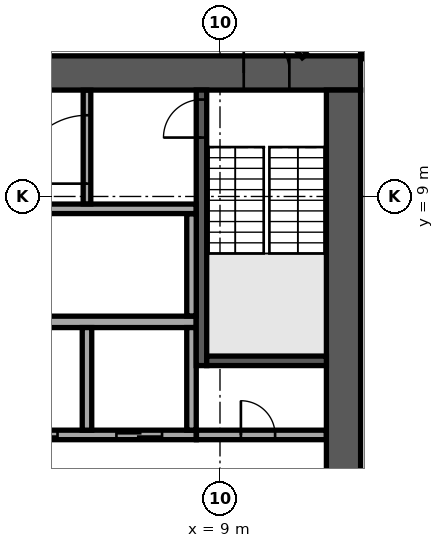
"""IFC4 building model, lengths in metres.
Left out: names, types, materials, properties, quantities, classifications, styles, units other than length and angle.
Written with IfcOpenShell. Run it as: python <this file> out.ifc"""

import sys

from ifc_helpers import new_model, si_unit, direction, frame, frame_2d, origin, place, context, subcontext, project, spatial, rectangle, extrude, element, fill, save


model = new_model("IFC4")
c1 = context("Model", 3, precision=1e-05, world=origin(), true_north=direction((0.0, 1.0)))
c2 = subcontext(c1, "Body", "Model", "MODEL_VIEW")
j1 = project(units=[si_unit("LENGTHUNIT", "METRE"), si_unit("PLANEANGLEUNIT", "RADIAN")], contexts=[c1])
p1 = place(None, origin())
s1 = spatial("IfcSite", under=j1, at=p1, CompositionType="ELEMENT")
p2 = place(p1, origin())
s2 = spatial("IfcBuilding", under=s1, at=p2, CompositionType="ELEMENT")
p3 = place(p2, frame((0.0, 0.0, 225.3)))
s3 = spatial("IfcBuildingStorey", under=s2, at=p3, CompositionType="ELEMENT", Elevation=225.3)
p4 = place(p3, frame((-12.7, 12.25, 0.0), z_axis=(0.0, 0.0, 1.0), x_axis=(1.0, 0.0, 0.0)))
e1 = element("IfcWall", 1, at=p4, inside=s3, PredefinedType="SHEAR", context=c2, shape_type="SweptSolid", body=[
    extrude(rectangle(XDim=25.4, YDim=0.9, at=frame_2d((12.7, 0.0))), origin(), (0.0, 0.0, 1.0), 3.62),
])
p5 = place(p4, frame((11.5, 0.0, 0.0)))
e2 = element("IfcOpeningElement", 2, at=p5, cuts=e1, PredefinedType="OPENING", context=c2, shape_type="SweptSolid", body=[
    extrude(rectangle(XDim=2.4, YDim=2.4, at=frame_2d((1.2, 1.2))), frame((0.0, 0.46, 0.0), z_axis=(0.0, -1.0, 0.0), x_axis=(1.0, 0.0, 0.0)), (0.0, 0.0, 1.0), 0.92),
])
p6 = place(p4, frame((22.325, 0.0, 0.0)))
e3 = element("IfcOpeningElement", 3, at=p6, cuts=e1, PredefinedType="OPENING", context=c2, shape_type="SweptSolid", body=[
    extrude(rectangle(XDim=1.2, YDim=2.1, at=frame_2d((0.6, 1.05))), frame((0.0, 0.46, 0.0), z_axis=(0.0, -1.0, 0.0), x_axis=(1.0, 0.0, 0.0)), (0.0, 0.0, 1.0), 0.92),
])
p7 = place(p4, frame((1.3, 0.0, 0.0)))
e4 = element("IfcOpeningElement", 4, at=p7, cuts=e1, PredefinedType="OPENING", context=c2, shape_type="SweptSolid", body=[
    extrude(rectangle(XDim=1.0, YDim=2.1, at=frame_2d((0.5, 1.05))), frame((0.0, 0.46, 0.0), z_axis=(0.0, -1.0, 0.0), x_axis=(1.0, 0.0, 0.0)), (0.0, 0.0, 1.0), 0.92),
])
p8 = place(p3, frame((12.25, -11.8, 0.0), z_axis=(0.0, 0.0, 1.0), x_axis=(0.0, 1.0, 0.0)))
e5 = element("IfcWall", 5, at=p8, inside=s3, PredefinedType="SHEAR", context=c2, shape_type="SweptSolid", body=[
    extrude(rectangle(XDim=23.6, YDim=0.9, at=frame_2d((11.8, 0.0))), origin(), (0.0, 0.0, 1.0), 3.62),
])
p9 = place(p8, frame((10.6, 0.0, 0.0)))
e6 = element("IfcOpeningElement", 6, at=p9, cuts=e5, PredefinedType="OPENING", context=c2, shape_type="SweptSolid", body=[
    extrude(rectangle(XDim=2.4, YDim=2.4, at=frame_2d((1.2, 1.2))), frame((0.0, 0.46, 0.0), z_axis=(0.0, -1.0, 0.0), x_axis=(1.0, 0.0, 0.0)), (0.0, 0.0, 1.0), 0.92),
])
p10 = place(p3, frame((-8.375, 5.7, 0.0), z_axis=(0.0, 0.0, 1.0), x_axis=(1.0, 0.0, 0.0)))
e7 = element("IfcWall", 7, at=p10, inside=s3, PredefinedType="SOLIDWALL", context=c2, shape_type="SweptSolid", body=[
    extrude(rectangle(XDim=16.75, YDim=0.3, at=frame_2d((8.375, 0.0))), origin(), (0.0, 0.0, 1.0), 3.62),
])
p11 = place(p3, frame((-8.375, 2.725, 0.0), z_axis=(0.0, 0.0, 1.0), x_axis=(1.0, 0.0, 0.0)))
e8 = element("IfcWall", 8, at=p11, inside=s3, PredefinedType="SOLIDWALL", context=c2, shape_type="SweptSolid", body=[
    extrude(rectangle(XDim=16.75, YDim=0.25, at=frame_2d((8.375, 0.0))), origin(), (0.0, 0.0, 1.0), 3.62),
])
p12 = place(p11, frame((0.9, 0.0, 0.0)))
e9 = element("IfcOpeningElement", 9, at=p12, cuts=e8, PredefinedType="OPENING", context=c2, shape_type="SweptSolid", body=[
    extrude(rectangle(XDim=1.2, YDim=2.1, at=frame_2d((0.6, 1.05))), frame((0.0, 0.135, 0.0), z_axis=(0.0, -1.0, 0.0), x_axis=(1.0, 0.0, 0.0)), (0.0, 0.0, 1.0), 0.27),
])
p13 = place(p11, frame((3.65, 0.0, 0.0)))
e10 = element("IfcOpeningElement", 10, at=p13, cuts=e8, PredefinedType="OPENING", context=c2, shape_type="SweptSolid", body=[
    extrude(rectangle(XDim=1.2, YDim=2.1, at=frame_2d((0.6, 1.05))), frame((0.0, 0.135, 0.0), z_axis=(0.0, -1.0, 0.0), x_axis=(1.0, 0.0, 0.0)), (0.0, 0.0, 1.0), 0.27),
])
p14 = place(p11, frame((6.4, 0.0, 0.0)))
e11 = element("IfcOpeningElement", 11, at=p14, cuts=e8, PredefinedType="OPENING", context=c2, shape_type="SweptSolid", body=[
    extrude(rectangle(XDim=1.2, YDim=2.1, at=frame_2d((0.6, 1.05))), frame((0.0, 0.135, 0.0), z_axis=(0.0, -1.0, 0.0), x_axis=(1.0, 0.0, 0.0)), (0.0, 0.0, 1.0), 0.27),
])
p15 = place(p11, frame((9.15, 0.0, 0.0)))
e12 = element("IfcOpeningElement", 12, at=p15, cuts=e8, PredefinedType="OPENING", context=c2, shape_type="SweptSolid", body=[
    extrude(rectangle(XDim=1.2, YDim=2.1, at=frame_2d((0.6, 1.05))), frame((0.0, 0.135, 0.0), z_axis=(0.0, -1.0, 0.0), x_axis=(1.0, 0.0, 0.0)), (0.0, 0.0, 1.0), 0.27),
])
p16 = place(p11, frame((11.9, 0.0, 0.0)))
e13 = element("IfcOpeningElement", 13, at=p16, cuts=e8, PredefinedType="OPENING", context=c2, shape_type="SweptSolid", body=[
    extrude(rectangle(XDim=1.2, YDim=2.1, at=frame_2d((0.6, 1.05))), frame((0.0, 0.135, 0.0), z_axis=(0.0, -1.0, 0.0), x_axis=(1.0, 0.0, 0.0)), (0.0, 0.0, 1.0), 0.27),
])
p17 = place(p11, frame((14.65, 0.0, 0.0)))
e14 = element("IfcOpeningElement", 14, at=p17, cuts=e8, PredefinedType="OPENING", context=c2, shape_type="SweptSolid", body=[
    extrude(rectangle(XDim=1.2, YDim=2.1, at=frame_2d((0.6, 1.05))), frame((0.0, 0.135, 0.0), z_axis=(0.0, -1.0, 0.0), x_axis=(1.0, 0.0, 0.0)), (0.0, 0.0, 1.0), 0.27),
])
for number, where, z_axis, x_axis in (
    (15, (5.5, 2.85, 0.0), (0.0, 0.0, 1.0), (0.0, 1.0, 0.0)),
    (16, (8.25, 2.85, 0.0), (0.0, 0.0, 1.0), (0.0, 1.0, 0.0)),
):
    element("IfcWall", number, at=place(p3, frame(where, z_axis=z_axis, x_axis=x_axis)), inside=s3, PredefinedType="SOLIDWALL", context=c2, shape_type="SweptSolid", body=[
        extrude(rectangle(XDim=2.7, YDim=0.25, at=frame_2d((1.35, 0.0))), origin(), (0.0, 0.0, 1.0), 3.62),
    ])
p18 = place(p3, frame((8.512, 4.55, 0.0), z_axis=(0.0, 0.0, 1.0), x_axis=(0.0, 1.0, 0.0)))
e17 = element("IfcWall", 17, at=p18, inside=s3, PredefinedType="SOLIDWALL", context=c2, shape_type="SweptSolid", body=[
    extrude(rectangle(XDim=7.25, YDim=0.275, at=frame_2d((3.625, 0.0))), origin(), (0.0, 0.0, 1.0), 3.62),
])
p19 = place(p18, frame((6.0, 0.0, 0.0)))
e18 = element("IfcOpeningElement", 18, at=p19, cuts=e17, PredefinedType="OPENING", context=c2, shape_type="SweptSolid", body=[
    extrude(rectangle(XDim=1.0, YDim=2.1, at=frame_2d((0.5, 1.05))), frame((0.0, 0.147, 0.0), z_axis=(0.0, -1.0, 0.0), x_axis=(1.0, 0.0, 0.0)), (0.0, 0.0, 1.0), 0.295),
])
p20 = place(p3, frame((8.65, 4.675, 0.0), z_axis=(0.0, 0.0, 1.0), x_axis=(1.0, 0.0, 0.0)))
e19 = element("IfcWall", 19, at=p20, inside=s3, PredefinedType="SOLIDWALL", context=c2, shape_type="SweptSolid", body=[
    extrude(rectangle(XDim=3.15, YDim=0.25, at=frame_2d((1.575, 0.0))), origin(), (0.0, 0.0, 1.0), 3.62),
])
p21 = place(p3, frame((8.38, 2.725, 0.0), z_axis=(0.0, 0.0, 1.0), x_axis=(1.0, 0.0, 0.0)))
e20 = element("IfcWall", 20, at=p21, inside=s3, PredefinedType="PARTITIONING", context=c2, shape_type="SweptSolid", body=[
    extrude(rectangle(XDim=3.415, YDim=0.25, at=frame_2d((1.708, 0.0))), origin(), (0.0, 0.0, 1.0), 3.62),
])
p22 = place(p21, frame((1.17, 0.0, 0.0)))
e21 = element("IfcOpeningElement", 21, at=p22, cuts=e20, PredefinedType="OPENING", context=c2, shape_type="SweptSolid", body=[
    extrude(rectangle(XDim=0.9, YDim=2.1, at=frame_2d((0.45, 1.05))), frame((0.0, 0.135, 0.0), z_axis=(0.0, -1.0, 0.0), x_axis=(1.0, 0.0, 0.0)), (0.0, 0.0, 1.0), 0.27),
])
p23 = place(p3, frame((8.25, 5.855, 0.0), z_axis=(0.0, 0.0, 1.0), x_axis=(0.0, 1.0, 0.0)))
e22 = element("IfcWall", 22, at=p23, inside=s3, PredefinedType="PARTITIONING", context=c2, shape_type="SweptSolid", body=[
    extrude(rectangle(XDim=2.69, YDim=0.25, at=frame_2d((1.345, 0.0))), origin(), (0.0, 0.0, 1.0), 3.62),
])
p24 = place(p3, frame((-8.35, 8.675, 0.0), z_axis=(0.0, 0.0, 1.0), x_axis=(1.0, 0.0, 0.0)))
e23 = element("IfcWall", 23, at=p24, inside=s3, PredefinedType="PARTITIONING", context=c2, shape_type="SweptSolid", body=[
    extrude(rectangle(XDim=16.72, YDim=0.25, at=frame_2d((8.36, 0.0))), origin(), (0.0, 0.0, 1.0), 3.62),
])
p25 = place(p24, frame((0.975, 0.0, 0.0)))
e24 = element("IfcOpeningElement", 24, at=p25, cuts=e23, PredefinedType="OPENING", context=c2, shape_type="SweptSolid", body=[
    extrude(rectangle(XDim=1.0, YDim=2.1, at=frame_2d((0.5, 1.05))), frame((0.0, 0.135, 0.0), z_axis=(0.0, -1.0, 0.0), x_axis=(1.0, 0.0, 0.0)), (0.0, 0.0, 1.0), 0.27),
])
p26 = place(p24, frame((6.375, 0.0, 0.0)))
e25 = element("IfcOpeningElement", 25, at=p26, cuts=e23, PredefinedType="OPENING", context=c2, shape_type="SweptSolid", body=[
    extrude(rectangle(XDim=1.2, YDim=2.1, at=frame_2d((0.6, 1.05))), frame((0.0, 0.135, 0.0), z_axis=(0.0, -1.0, 0.0), x_axis=(1.0, 0.0, 0.0)), (0.0, 0.0, 1.0), 0.27),
])
p27 = place(p3, frame((5.5, 8.805, 0.0), z_axis=(0.0, 0.0, 1.0), x_axis=(0.0, 1.0, 0.0)))
e26 = element("IfcWall", 26, at=p27, inside=s3, PredefinedType="PARTITIONING", context=c2, shape_type="SweptSolid", body=[
    extrude(rectangle(XDim=2.99, YDim=0.2, at=frame_2d((1.495, 0.0))), origin(), (0.0, 0.0, 1.0), 3.62),
])
p28 = place(p27, frame((0.532, 0.0, 0.0)))
e27 = element("IfcOpeningElement", 27, at=p28, cuts=e26, PredefinedType="OPENING", context=c2, shape_type="SweptSolid", body=[
    extrude(rectangle(XDim=1.8, YDim=2.1, at=frame_2d((0.9, 1.05))), frame((0.0, 0.11, 0.0), z_axis=(0.0, -1.0, 0.0), x_axis=(1.0, 0.0, 0.0)), (0.0, 0.0, 1.0), 0.22),
])
p29 = place(p3, frame((3.777, -34.584, 0.0), z_axis=(0.0, 0.0, 1.0), x_axis=(0.629323778295, 0.777143218508, 0.0)))
e28 = element("IfcWall", 28, at=p29, inside=s3, PredefinedType="STANDARD", context=c2, shape_type="SweptSolid", body=[
    extrude(rectangle(XDim=49.0, YDim=0.6, at=frame_2d((24.5, 0.0))), origin(), (0.0, 0.0, 1.0), 3.62),
])
p30 = place(p29, frame((1.227, 0.0, 0.9)))
e29 = element("IfcOpeningElement", 29, at=p30, cuts=e28, PredefinedType="OPENING", context=c2, shape_type="SweptSolid", body=[
    extrude(rectangle(XDim=2.0, YDim=2.1, at=frame_2d((1.0, 1.05))), frame((0.0, 0.31, 0.0), z_axis=(0.0, -1.0, 0.0), x_axis=(1.0, 0.0, 0.0)), (0.0, 0.0, 1.0), 0.62),
])
p31 = place(p29, frame((5.682, 0.0, 0.9)))
e30 = element("IfcOpeningElement", 30, at=p31, cuts=e28, PredefinedType="OPENING", context=c2, shape_type="SweptSolid", body=[
    extrude(rectangle(XDim=2.0, YDim=2.1, at=frame_2d((1.0, 1.05))), frame((0.0, 0.31, 0.0), z_axis=(0.0, -1.0, 0.0), x_axis=(1.0, 0.0, 0.0)), (0.0, 0.0, 1.0), 0.62),
])
p32 = place(p29, frame((10.136, 0.0, 0.9)))
e31 = element("IfcOpeningElement", 31, at=p32, cuts=e28, PredefinedType="OPENING", context=c2, shape_type="SweptSolid", body=[
    extrude(rectangle(XDim=2.0, YDim=2.1, at=frame_2d((1.0, 1.05))), frame((0.0, 0.31, 0.0), z_axis=(0.0, -1.0, 0.0), x_axis=(1.0, 0.0, 0.0)), (0.0, 0.0, 1.0), 0.62),
])
p33 = place(p29, frame((14.591, 0.0, 0.9)))
e32 = element("IfcOpeningElement", 32, at=p33, cuts=e28, PredefinedType="OPENING", context=c2, shape_type="SweptSolid", body=[
    extrude(rectangle(XDim=2.0, YDim=2.1, at=frame_2d((1.0, 1.05))), frame((0.0, 0.31, 0.0), z_axis=(0.0, -1.0, 0.0), x_axis=(1.0, 0.0, 0.0)), (0.0, 0.0, 1.0), 0.62),
])
p34 = place(p29, frame((19.045, 0.0, 0.9)))
e33 = element("IfcOpeningElement", 33, at=p34, cuts=e28, PredefinedType="OPENING", context=c2, shape_type="SweptSolid", body=[
    extrude(rectangle(XDim=2.0, YDim=2.1, at=frame_2d((1.0, 1.05))), frame((0.0, 0.31, 0.0), z_axis=(0.0, -1.0, 0.0), x_axis=(1.0, 0.0, 0.0)), (0.0, 0.0, 1.0), 0.62),
])
p35 = place(p29, frame((23.5, 0.0, 0.9)))
e34 = element("IfcOpeningElement", 34, at=p35, cuts=e28, PredefinedType="OPENING", context=c2, shape_type="SweptSolid", body=[
    extrude(rectangle(XDim=2.0, YDim=2.1, at=frame_2d((1.0, 1.05))), frame((0.0, 0.31, 0.0), z_axis=(0.0, -1.0, 0.0), x_axis=(1.0, 0.0, 0.0)), (0.0, 0.0, 1.0), 0.62),
])
p36 = place(p29, frame((27.955, 0.0, 0.9)))
e35 = element("IfcOpeningElement", 35, at=p36, cuts=e28, PredefinedType="OPENING", context=c2, shape_type="SweptSolid", body=[
    extrude(rectangle(XDim=2.0, YDim=2.1, at=frame_2d((1.0, 1.05))), frame((0.0, 0.31, 0.0), z_axis=(0.0, -1.0, 0.0), x_axis=(1.0, 0.0, 0.0)), (0.0, 0.0, 1.0), 0.62),
])
p37 = place(p29, frame((32.409, 0.0, 0.9)))
e36 = element("IfcOpeningElement", 36, at=p37, cuts=e28, PredefinedType="OPENING", context=c2, shape_type="SweptSolid", body=[
    extrude(rectangle(XDim=2.0, YDim=2.1, at=frame_2d((1.0, 1.05))), frame((0.0, 0.31, 0.0), z_axis=(0.0, -1.0, 0.0), x_axis=(1.0, 0.0, 0.0)), (0.0, 0.0, 1.0), 0.62),
])
p38 = place(p29, frame((36.864, 0.0, 0.9)))
e37 = element("IfcOpeningElement", 37, at=p38, cuts=e28, PredefinedType="OPENING", context=c2, shape_type="SweptSolid", body=[
    extrude(rectangle(XDim=2.0, YDim=2.1, at=frame_2d((1.0, 1.05))), frame((0.0, 0.31, 0.0), z_axis=(0.0, -1.0, 0.0), x_axis=(1.0, 0.0, 0.0)), (0.0, 0.0, 1.0), 0.62),
])
p39 = place(p29, frame((41.318, 0.0, 0.9)))
e38 = element("IfcOpeningElement", 38, at=p39, cuts=e28, PredefinedType="OPENING", context=c2, shape_type="SweptSolid", body=[
    extrude(rectangle(XDim=2.0, YDim=2.1, at=frame_2d((1.0, 1.05))), frame((0.0, 0.31, 0.0), z_axis=(0.0, -1.0, 0.0), x_axis=(1.0, 0.0, 0.0)), (0.0, 0.0, 1.0), 0.62),
])
p40 = place(p29, frame((45.773, 0.0, 0.9)))
e39 = element("IfcOpeningElement", 39, at=p40, cuts=e28, PredefinedType="OPENING", context=c2, shape_type="SweptSolid", body=[
    extrude(rectangle(XDim=2.0, YDim=2.1, at=frame_2d((1.0, 1.05))), frame((0.0, 0.31, 0.0), z_axis=(0.0, -1.0, 0.0), x_axis=(1.0, 0.0, 0.0)), (0.0, 0.0, 1.0), 0.62),
])
p41 = place(p3, frame((33.845, 10.81, 0.0), z_axis=(0.0, 0.0, 1.0), x_axis=(-0.777145437972, 0.629321037499, 0.0)))
e40 = element("IfcWall", 40, at=p41, inside=s3, PredefinedType="STANDARD", context=c2, shape_type="SweptSolid", body=[
    extrude(rectangle(XDim=39.0, YDim=0.6, at=frame_2d((19.5, 0.0))), origin(), (0.0, 0.0, 1.0), 3.62),
])
p42 = place(p41, frame((1.217, 0.0, 0.9)))
e41 = element("IfcOpeningElement", 41, at=p42, cuts=e40, PredefinedType="OPENING", context=c2, shape_type="SweptSolid", body=[
    extrude(rectangle(XDim=1.9, YDim=2.1, at=frame_2d((0.95, 1.05))), frame((0.0, 0.31, 0.0), z_axis=(0.0, -1.0, 0.0), x_axis=(1.0, 0.0, 0.0)), (0.0, 0.0, 1.0), 0.62),
])
p43 = place(p41, frame((5.55, 0.0, 0.9)))
e42 = element("IfcOpeningElement", 42, at=p43, cuts=e40, PredefinedType="OPENING", context=c2, shape_type="SweptSolid", body=[
    extrude(rectangle(XDim=1.9, YDim=2.1, at=frame_2d((0.95, 1.05))), frame((0.0, 0.31, 0.0), z_axis=(0.0, -1.0, 0.0), x_axis=(1.0, 0.0, 0.0)), (0.0, 0.0, 1.0), 0.62),
])
p44 = place(p41, frame((9.883, 0.0, 0.9)))
e43 = element("IfcOpeningElement", 43, at=p44, cuts=e40, PredefinedType="OPENING", context=c2, shape_type="SweptSolid", body=[
    extrude(rectangle(XDim=1.9, YDim=2.1, at=frame_2d((0.95, 1.05))), frame((0.0, 0.31, 0.0), z_axis=(0.0, -1.0, 0.0), x_axis=(1.0, 0.0, 0.0)), (0.0, 0.0, 1.0), 0.62),
])
p45 = place(p41, frame((14.217, 0.0, 0.9)))
e44 = element("IfcOpeningElement", 44, at=p45, cuts=e40, PredefinedType="OPENING", context=c2, shape_type="SweptSolid", body=[
    extrude(rectangle(XDim=1.9, YDim=2.1, at=frame_2d((0.95, 1.05))), frame((0.0, 0.31, 0.0), z_axis=(0.0, -1.0, 0.0), x_axis=(1.0, 0.0, 0.0)), (0.0, 0.0, 1.0), 0.62),
])
p46 = place(p41, frame((18.55, 0.0, 0.9)))
e45 = element("IfcOpeningElement", 45, at=p46, cuts=e40, PredefinedType="OPENING", context=c2, shape_type="SweptSolid", body=[
    extrude(rectangle(XDim=1.9, YDim=2.1, at=frame_2d((0.95, 1.05))), frame((0.0, 0.31, 0.0), z_axis=(0.0, -1.0, 0.0), x_axis=(1.0, 0.0, 0.0)), (0.0, 0.0, 1.0), 0.62),
])
p47 = place(p41, frame((22.883, 0.0, 0.9)))
e46 = element("IfcOpeningElement", 46, at=p47, cuts=e40, PredefinedType="OPENING", context=c2, shape_type="SweptSolid", body=[
    extrude(rectangle(XDim=1.9, YDim=2.1, at=frame_2d((0.95, 1.05))), frame((0.0, 0.31, 0.0), z_axis=(0.0, -1.0, 0.0), x_axis=(1.0, 0.0, 0.0)), (0.0, 0.0, 1.0), 0.62),
])
p48 = place(p41, frame((27.217, 0.0, 0.9)))
e47 = element("IfcOpeningElement", 47, at=p48, cuts=e40, PredefinedType="OPENING", context=c2, shape_type="SweptSolid", body=[
    extrude(rectangle(XDim=1.9, YDim=2.1, at=frame_2d((0.95, 1.05))), frame((0.0, 0.31, 0.0), z_axis=(0.0, -1.0, 0.0), x_axis=(1.0, 0.0, 0.0)), (0.0, 0.0, 1.0), 0.62),
])
p49 = place(p41, frame((31.55, 0.0, 0.9)))
e48 = element("IfcOpeningElement", 48, at=p49, cuts=e40, PredefinedType="OPENING", context=c2, shape_type="SweptSolid", body=[
    extrude(rectangle(XDim=1.9, YDim=2.1, at=frame_2d((0.95, 1.05))), frame((0.0, 0.31, 0.0), z_axis=(0.0, -1.0, 0.0), x_axis=(1.0, 0.0, 0.0)), (0.0, 0.0, 1.0), 0.62),
])
p50 = place(p41, frame((35.883, 0.0, 0.9)))
e49 = element("IfcOpeningElement", 49, at=p50, cuts=e40, PredefinedType="OPENING", context=c2, shape_type="SweptSolid", body=[
    extrude(rectangle(XDim=1.9, YDim=2.1, at=frame_2d((0.95, 1.05))), frame((0.0, 0.31, 0.0), z_axis=(0.0, -1.0, 0.0), x_axis=(1.0, 0.0, 0.0)), (0.0, 0.0, 1.0), 0.62),
])
p51 = place(p3, frame((3.18, -26.643, 0.0), z_axis=(0.0, 0.0, 1.0), x_axis=(0.629322822444, 0.777143992547, 0.0)))
e50 = element("IfcWall", 50, at=p51, inside=s3, PredefinedType="PARTITIONING", context=c2, shape_type="SweptSolid", body=[
    extrude(rectangle(XDim=37.483, YDim=0.15, at=frame_2d((18.741, 0.0))), origin(), (0.0, 0.0, 1.0), 3.17),
])
p52 = place(p51, frame((6.346, 0.0, 0.0)))
e51 = element("IfcOpeningElement", 51, at=p52, cuts=e50, PredefinedType="OPENING", context=c2, shape_type="SweptSolid", body=[
    extrude(rectangle(XDim=1.0, YDim=2.1, at=frame_2d((0.5, 1.05))), frame((0.0, 0.085, 0.0), z_axis=(0.0, -1.0, 0.0), x_axis=(1.0, 0.0, 0.0)), (0.0, 0.0, 1.0), 0.17),
])
p53 = place(p51, frame((16.452, 0.0, 0.0)))
e52 = element("IfcOpeningElement", 52, at=p53, cuts=e50, PredefinedType="OPENING", context=c2, shape_type="SweptSolid", body=[
    extrude(rectangle(XDim=1.0, YDim=2.1, at=frame_2d((0.5, 1.05))), frame((0.0, 0.085, 0.0), z_axis=(0.0, -1.0, 0.0), x_axis=(1.0, 0.0, 0.0)), (0.0, 0.0, 1.0), 0.17),
])
p54 = place(p51, frame((23.4, 0.0, 0.0)))
e53 = element("IfcOpeningElement", 53, at=p54, cuts=e50, PredefinedType="OPENING", context=c2, shape_type="SweptSolid", body=[
    extrude(rectangle(XDim=1.0, YDim=2.1, at=frame_2d((0.5, 1.05))), frame((0.0, 0.085, 0.0), z_axis=(0.0, -1.0, 0.0), x_axis=(1.0, 0.0, 0.0)), (0.0, 0.0, 1.0), 0.17),
])
p55 = place(p3, frame((3.616, 25.688, 0.0), z_axis=(0.0, 0.0, 1.0), x_axis=(0.777137029952, -0.62933142038, 0.0)))
e54 = element("IfcWall", 54, at=p55, inside=s3, PredefinedType="PARTITIONING", context=c2, shape_type="SweptSolid", body=[
    extrude(rectangle(XDim=26.785, YDim=0.15, at=frame_2d((13.393, 0.0))), origin(), (0.0, 0.0, 1.0), 3.17),
])
p56 = place(p55, frame((12.682, 0.0, 0.0)))
e55 = element("IfcOpeningElement", 55, at=p56, cuts=e54, PredefinedType="OPENING", context=c2, shape_type="SweptSolid", body=[
    extrude(rectangle(XDim=1.0, YDim=2.1, at=frame_2d((0.5, 1.05))), frame((0.0, 0.085, 0.0), z_axis=(0.0, -1.0, 0.0), x_axis=(1.0, 0.0, 0.0)), (0.0, 0.0, 1.0), 0.17),
])
p57 = place(p55, frame((16.597, 0.0, 0.0)))
e56 = element("IfcOpeningElement", 56, at=p57, cuts=e54, PredefinedType="OPENING", context=c2, shape_type="SweptSolid", body=[
    extrude(rectangle(XDim=1.0, YDim=2.1, at=frame_2d((0.5, 1.05))), frame((0.0, 0.085, 0.0), z_axis=(0.0, -1.0, 0.0), x_axis=(1.0, 0.0, 0.0)), (0.0, 0.0, 1.0), 0.17),
])
p58 = place(p3, frame((10.495, 13.6, 0.0), z_axis=(0.0, 0.0, 1.0), x_axis=(0.629870659229, -0.776700040326, 0.0)))
e57 = element("IfcWall", 57, at=p58, inside=s3, PredefinedType="PARTITIONING", context=c2, shape_type="SweptSolid", body=[
    extrude(rectangle(XDim=1.159, YDim=0.15, at=frame_2d((0.58, 0.0))), origin(), (0.0, 0.0, 1.0), 3.17),
])
p59 = place(p3, frame((12.172, 15.671, 0.0), z_axis=(0.0, 0.0, 1.0), x_axis=(0.777123609621, -0.629347992266, 0.0)))
e58 = element("IfcWall", 58, at=p59, inside=s3, PredefinedType="PARTITIONING", context=c2, shape_type="SweptSolid", body=[
    extrude(rectangle(XDim=13.833, YDim=0.15, at=frame_2d((6.917, 0.0))), origin(), (0.0, 0.0, 1.0), 3.17),
])
p60 = place(p59, frame((11.324, 0.0, 0.0)))
e59 = element("IfcOpeningElement", 59, at=p60, cuts=e58, PredefinedType="OPENING", context=c2, shape_type="SweptSolid", body=[
    extrude(rectangle(XDim=1.8, YDim=2.1, at=frame_2d((0.9, 1.05))), frame((0.0, 0.085, 0.0), z_axis=(0.0, -1.0, 0.0), x_axis=(1.0, 0.0, 0.0)), (0.0, 0.0, 1.0), 0.17),
])
p61 = place(p3, frame((12.7, 12.7, 0.0), z_axis=(0.0, 0.0, 1.0), x_axis=(1.0, 0.0, 0.0)))
e60 = element("IfcWall", 60, at=p61, inside=s3, PredefinedType="PARTITIONING", context=c2, shape_type="SweptSolid", body=[
    extrude(rectangle(XDim=2.7, YDim=0.15, at=frame_2d((1.35, 0.0))), origin(), (0.0, 0.0, 1.0), 3.17),
])
p62 = place(p6, origin())
e61 = element("IfcDoor", 61, at=p62, inside=s3, OperationType="SINGLE_SWING_LEFT", PredefinedType="DOOR", context=c2, shape_type="SweptSolid", body=[
    extrude(rectangle(XDim=1.2, YDim=2.1, at=frame_2d((0.6, 1.05))), frame((0.0, 0.025, 0.0), z_axis=(0.0, -1.0, 0.0), x_axis=(1.0, 0.0, 0.0)), (0.0, 0.0, 1.0), 0.05),
])
fill(e3, e61)
p63 = place(p16, origin())
e62 = element("IfcDoor", 62, at=p63, inside=s3, OperationType="DOUBLE_DOOR_SLIDING", PredefinedType="DOOR", context=c2, shape_type="SweptSolid", body=[
    extrude(rectangle(XDim=1.2, YDim=2.1, at=frame_2d((0.6, 1.05))), frame((0.0, 0.025, 0.0), z_axis=(0.0, -1.0, 0.0), x_axis=(1.0, 0.0, 0.0)), (0.0, 0.0, 1.0), 0.05),
])
fill(e13, e62)
p64 = place(p17, origin())
e63 = element("IfcDoor", 63, at=p64, inside=s3, OperationType="DOUBLE_DOOR_SLIDING", PredefinedType="DOOR", context=c2, shape_type="SweptSolid", body=[
    extrude(rectangle(XDim=1.2, YDim=2.1, at=frame_2d((0.6, 1.05))), frame((0.0, 0.025, 0.0), z_axis=(0.0, -1.0, 0.0), x_axis=(1.0, 0.0, 0.0)), (0.0, 0.0, 1.0), 0.05),
])
fill(e14, e63)
p65 = place(p19, origin())
e64 = element("IfcDoor", 64, at=p65, inside=s3, OperationType="SINGLE_SWING_LEFT", PredefinedType="DOOR", context=c2, shape_type="SweptSolid", body=[
    extrude(rectangle(XDim=1.0, YDim=2.1, at=frame_2d((0.5, 1.05))), frame((0.0, 0.025, 0.0), z_axis=(0.0, -1.0, 0.0), x_axis=(1.0, 0.0, 0.0)), (0.0, 0.0, 1.0), 0.05),
])
fill(e18, e64)
p66 = place(p22, origin())
e65 = element("IfcDoor", 65, at=p66, inside=s3, OperationType="SINGLE_SWING_RIGHT", PredefinedType="DOOR", context=c2, shape_type="SweptSolid", body=[
    extrude(rectangle(XDim=0.9, YDim=2.1, at=frame_2d((0.45, 1.05))), frame((0.0, 0.025, 0.0), z_axis=(0.0, -1.0, 0.0), x_axis=(1.0, 0.0, 0.0)), (0.0, 0.0, 1.0), 0.05),
])
fill(e21, e65)
p67 = place(p28, origin())
e66 = element("IfcDoor", 66, at=p67, inside=s3, OperationType="SINGLE_SWING_LEFT", PredefinedType="DOOR", context=c2, shape_type="SweptSolid", body=[
    extrude(rectangle(XDim=1.8, YDim=2.1, at=frame_2d((0.9, 1.05))), frame((0.0, 0.025, 0.0), z_axis=(0.0, -1.0, 0.0), x_axis=(1.0, 0.0, 0.0)), (0.0, 0.0, 1.0), 0.05),
])
fill(e27, e66)
save(model, sys.argv[1])
